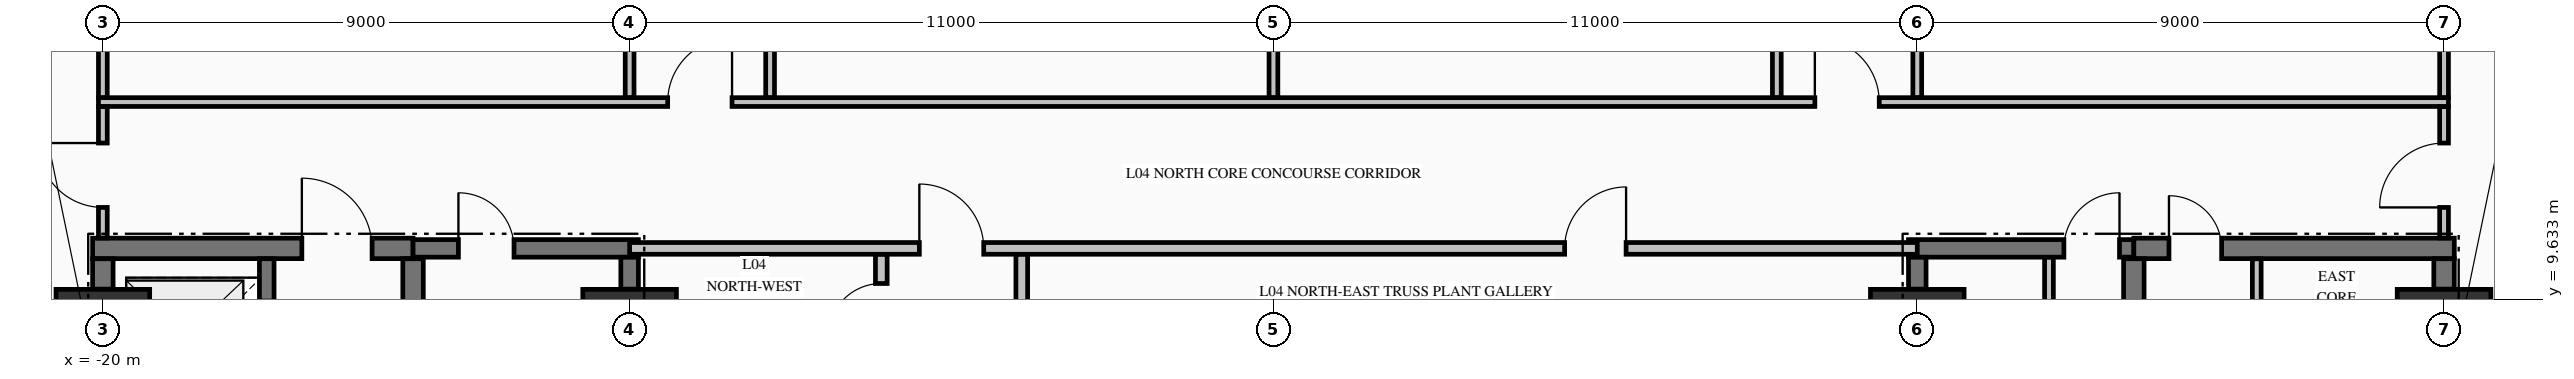
"""IFC4 building model, lengths in metres.
Left out: names, types, materials, properties, quantities, classifications, styles, units other than length and angle.
Written with IfcOpenShell. Run it as: python <this file> out.ifc"""

import sys

from ifc_helpers import new_model, si_unit, direction, frame, frame_2d, origin, origin_2d, place, context, subcontext, project, spatial, rectangle, extrude, element, fill, save


model = new_model("IFC4")
c1 = context("Model", 3, precision=1e-05, world=origin(), true_north=direction((0.0, 1.0)))
c2 = subcontext(c1, "Body", "Model", "MODEL_VIEW")
j1 = project(units=[si_unit("LENGTHUNIT", "METRE"), si_unit("PLANEANGLEUNIT", "RADIAN")], contexts=[c1])
p1 = place(None, origin())
s1 = spatial("IfcSite", under=j1, at=p1, CompositionType="ELEMENT")
p2 = place(p1, origin())
s2 = spatial("IfcBuilding", under=s1, at=p2, CompositionType="ELEMENT")
p3 = place(p2, frame((0.0, 0.0, 21.76)))
s3 = spatial("IfcBuildingStorey", under=s2, at=p3, CompositionType="ELEMENT", Elevation=21.76)
for number, where, z_axis, x_axis in (
    (1, (-20.0, 9.0, -0.45), (0.0, 0.0, 1.0), (1.0, 0.0, 0.0)),
    (2, (-11.0, 9.0, -0.45), (0.0, 0.0, 1.0), (1.0, 0.0, 0.0)),
    (3, (11.0, 9.0, -0.45), (0.0, 0.0, 1.0), (1.0, 0.0, 0.0)),
    (4, (20.0, 9.0, -0.45), (0.0, 0.0, 1.0), (1.0, 0.0, 0.0)),
):
    element("IfcColumn", number, at=place(p3, frame(where, z_axis=z_axis, x_axis=x_axis)), inside=s3, PredefinedType="COLUMN", context=c2, shape_type="SweptSolid", body=[
        extrude(rectangle(XDim=1.6, YDim=1.6, at=origin_2d()), origin(), (0.0, 0.0, 1.0), 5.44),
    ])
p4 = place(p3, frame((-20.175, 10.5, 0.0), z_axis=(0.0, 0.0, 1.0), x_axis=(1.0, 0.0, 0.0)))
e5 = element("IfcWall", 5, at=p4, inside=s3, PredefinedType="SHEAR", context=c2, shape_type="SweptSolid", body=[
    extrude(rectangle(XDim=5.475, YDim=0.35, at=frame_2d((2.738, 0.0))), origin(), (0.0, 0.0, 1.0), 4.99),
])
p5 = place(p4, frame((3.575, 0.0, 0.0)))
e6 = element("IfcOpeningElement", 6, at=p5, cuts=e5, PredefinedType="OPENING", context=c2, shape_type="SweptSolid", body=[
    extrude(rectangle(XDim=1.2, YDim=2.15, at=frame_2d((0.6, 1.075))), frame((0.0, 0.185, 0.0), z_axis=(0.0, -1.0, 0.0), x_axis=(1.0, 0.0, 0.0)), (0.0, 0.0, 1.0), 0.37),
])
p6 = place(p3, frame((-14.7, 10.5, 0.0), z_axis=(0.0, 0.0, 1.0), x_axis=(1.0, 0.0, 0.0)))
e7 = element("IfcWall", 7, at=p6, inside=s3, PredefinedType="SHEAR", context=c2, shape_type="SweptSolid", body=[
    extrude(rectangle(XDim=3.85, YDim=0.3, at=frame_2d((1.925, 0.0))), origin(), (0.0, 0.0, 1.0), 4.99),
])
p7 = place(p6, frame((0.775, 0.0, 0.0)))
e8 = element("IfcOpeningElement", 8, at=p7, cuts=e7, PredefinedType="OPENING", context=c2, shape_type="SweptSolid", body=[
    extrude(rectangle(XDim=0.95, YDim=2.15, at=frame_2d((0.475, 1.075))), frame((0.0, 0.16, 0.0), z_axis=(0.0, -1.0, 0.0), x_axis=(1.0, 0.0, 0.0)), (0.0, 0.0, 1.0), 0.32),
])
p8 = place(p3, frame((10.85, 10.5, 0.0), z_axis=(0.0, 0.0, 1.0), x_axis=(1.0, 0.0, 0.0)))
e9 = element("IfcWall", 9, at=p8, inside=s3, PredefinedType="SHEAR", context=c2, shape_type="SweptSolid", body=[
    extrude(rectangle(XDim=3.85, YDim=0.3, at=frame_2d((1.925, 0.0))), origin(), (0.0, 0.0, 1.0), 4.99),
])
p9 = place(p8, frame((2.655, 0.0, 0.0)))
e10 = element("IfcOpeningElement", 10, at=p9, cuts=e9, PredefinedType="OPENING", context=c2, shape_type="SweptSolid", body=[
    extrude(rectangle(XDim=0.95, YDim=2.15, at=frame_2d((0.475, 1.075))), frame((0.0, 0.16, 0.0), z_axis=(0.0, -1.0, 0.0), x_axis=(1.0, 0.0, 0.0)), (0.0, 0.0, 1.0), 0.32),
])
p10 = place(p3, frame((14.7, 10.5, 0.0), z_axis=(0.0, 0.0, 1.0), x_axis=(1.0, 0.0, 0.0)))
e11 = element("IfcWall", 11, at=p10, inside=s3, PredefinedType="SHEAR", context=c2, shape_type="SweptSolid", body=[
    extrude(rectangle(XDim=5.475, YDim=0.35, at=frame_2d((2.738, 0.0))), origin(), (0.0, 0.0, 1.0), 4.99),
])
p11 = place(p10, frame((0.6, 0.0, 0.0)))
e12 = element("IfcOpeningElement", 12, at=p11, cuts=e11, PredefinedType="OPENING", context=c2, shape_type="SweptSolid", body=[
    extrude(rectangle(XDim=0.9, YDim=2.15, at=frame_2d((0.45, 1.075))), frame((0.0, 0.185, 0.0), z_axis=(0.0, -1.0, 0.0), x_axis=(1.0, 0.0, 0.0)), (0.0, 0.0, 1.0), 0.37),
])
p12 = place(p3, frame((-11.0, 10.5, 0.0), z_axis=(0.0, 0.0, 1.0), x_axis=(1.0, 0.0, 0.0)))
e13 = element("IfcWall", 13, at=p12, inside=s3, PredefinedType="PARTITIONING", context=c2, shape_type="SweptSolid", body=[
    extrude(rectangle(XDim=22.0, YDim=0.2, at=frame_2d((11.0, 0.0))), origin(), (0.0, 0.0, 1.0), 3.332),
])
p13 = place(p12, frame((4.95, 0.0, 0.0)))
e14 = element("IfcOpeningElement", 14, at=p13, cuts=e13, PredefinedType="OPENING", context=c2, shape_type="SweptSolid", body=[
    extrude(rectangle(XDim=1.1, YDim=2.15, at=frame_2d((0.55, 1.075))), frame((0.0, 0.11, 0.0), z_axis=(0.0, -1.0, 0.0), x_axis=(1.0, 0.0, 0.0)), (0.0, 0.0, 1.0), 0.22),
])
p14 = place(p12, frame((15.975, 0.0, 0.0)))
e15 = element("IfcOpeningElement", 15, at=p14, cuts=e13, PredefinedType="OPENING", context=c2, shape_type="SweptSolid", body=[
    extrude(rectangle(XDim=1.05, YDim=2.15, at=frame_2d((0.525, 1.075))), frame((0.0, 0.11, 0.0), z_axis=(0.0, -1.0, 0.0), x_axis=(1.0, 0.0, 0.0)), (0.0, 0.0, 1.0), 0.22),
])
p15 = place(p3, frame((-20.075, 13.0, 0.0), z_axis=(0.0, 0.0, 1.0), x_axis=(1.0, 0.0, 0.0)))
e16 = element("IfcWall", 16, at=p15, inside=s3, PredefinedType="PARTITIONING", context=c2, shape_type="SweptSolid", body=[
    extrude(rectangle(XDim=40.15, YDim=0.15, at=frame_2d((20.075, 0.0))), origin(), (0.0, 0.0, 1.0), 4.99),
])
p16 = place(p15, frame((9.725, 0.0, 0.0)))
e17 = element("IfcOpeningElement", 17, at=p16, cuts=e16, PredefinedType="OPENING", context=c2, shape_type="SweptSolid", body=[
    extrude(rectangle(XDim=1.1, YDim=2.15, at=frame_2d((0.55, 1.075))), frame((0.0, 0.085, 0.0), z_axis=(0.0, -1.0, 0.0), x_axis=(1.0, 0.0, 0.0)), (0.0, 0.0, 1.0), 0.17),
])
p17 = place(p15, frame((29.325, 0.0, 0.0)))
e18 = element("IfcOpeningElement", 18, at=p17, cuts=e16, PredefinedType="OPENING", context=c2, shape_type="SweptSolid", body=[
    extrude(rectangle(XDim=1.1, YDim=2.15, at=frame_2d((0.55, 1.075))), frame((0.0, 0.085, 0.0), z_axis=(0.0, -1.0, 0.0), x_axis=(1.0, 0.0, 0.0)), (0.0, 0.0, 1.0), 0.17),
])
p18 = place(p3, frame((-20.0, 9.804, 0.0), z_axis=(0.0, 0.0, 1.0), x_axis=(0.0, 1.0, 0.0)))
e19 = element("IfcWall", 19, at=p18, inside=s3, PredefinedType="SHEAR", context=c2, shape_type="SweptSolid", body=[
    extrude(rectangle(XDim=0.519, YDim=0.35, at=frame_2d((0.26, 0.0))), origin(), (0.0, 0.0, 1.0), 4.99),
])
p19 = place(p3, frame((-17.2, 7.727, 0.0), z_axis=(0.0, 0.0, 1.0), x_axis=(0.0, 1.0, 0.0)))
e20 = element("IfcWall", 20, at=p19, inside=s3, PredefinedType="SOLIDWALL", context=c2, shape_type="SweptSolid", body=[
    extrude(rectangle(XDim=2.596, YDim=0.25, at=frame_2d((1.298, 0.0))), origin(), (0.0, 0.0, 1.0), 4.99),
])
p20 = place(p19, frame((0.773, 0.0, 0.0)))
e21 = element("IfcOpeningElement", 21, at=p20, cuts=e20, PredefinedType="OPENING", context=c2, shape_type="SweptSolid", body=[
    extrude(rectangle(XDim=1.1, YDim=2.2, at=frame_2d((0.55, 1.1))), frame((0.0, 0.135, 0.0), z_axis=(0.0, -1.0, 0.0), x_axis=(1.0, 0.0, 0.0)), (0.0, 0.0, 1.0), 0.27),
])
p21 = place(p3, frame((-14.7, 5.852, 0.0), z_axis=(0.0, 0.0, 1.0), x_axis=(0.0, 1.0, 0.0)))
e22 = element("IfcWall", 22, at=p21, inside=s3, PredefinedType="SHEAR", context=c2, shape_type="SweptSolid", body=[
    extrude(rectangle(XDim=4.471, YDim=0.35, at=frame_2d((2.235, 0.0))), origin(), (0.0, 0.0, 1.0), 4.99),
])
for number, where, z_axis, x_axis in (
    (23, (-11.0, 9.804, 0.0), (0.0, 0.0, 1.0), (0.0, 1.0, 0.0)),
    (24, (11.0, 9.804, 0.0), (0.0, 0.0, 1.0), (0.0, 1.0, 0.0)),
):
    element("IfcWall", number, at=place(p3, frame(where, z_axis=z_axis, x_axis=x_axis)), inside=s3, PredefinedType="SHEAR", context=c2, shape_type="SweptSolid", body=[
        extrude(rectangle(XDim=0.544, YDim=0.3, at=frame_2d((0.272, 0.0))), origin(), (0.0, 0.0, 1.0), 4.99),
    ])
p22 = place(p3, frame((14.7, 5.852, 0.0), z_axis=(0.0, 0.0, 1.0), x_axis=(0.0, 1.0, 0.0)))
e25 = element("IfcWall", 25, at=p22, inside=s3, PredefinedType="SHEAR", context=c2, shape_type="SweptSolid", body=[
    extrude(rectangle(XDim=4.471, YDim=0.35, at=frame_2d((2.235, 0.0))), origin(), (0.0, 0.0, 1.0), 4.99),
])
p23 = place(p3, frame((20.0, 9.804, 0.0), z_axis=(0.0, 0.0, 1.0), x_axis=(0.0, 1.0, 0.0)))
e26 = element("IfcWall", 26, at=p23, inside=s3, PredefinedType="SHEAR", context=c2, shape_type="SweptSolid", body=[
    extrude(rectangle(XDim=0.519, YDim=0.35, at=frame_2d((0.26, 0.0))), origin(), (0.0, 0.0, 1.0), 4.99),
])
p24 = place(p3, frame((-20.0, 10.678, 0.0), z_axis=(0.0, 0.0, 1.0), x_axis=(0.0, 1.0, 0.0)))
e27 = element("IfcWall", 27, at=p24, inside=s3, PredefinedType="PARTITIONING", context=c2, shape_type="SweptSolid", body=[
    extrude(rectangle(XDim=2.244, YDim=0.15, at=frame_2d((1.122, 0.0))), origin(), (0.0, 0.0, 1.0), 4.032),
])
p25 = place(p24, frame((0.522, 0.0, 0.0)))
e28 = element("IfcOpeningElement", 28, at=p25, cuts=e27, PredefinedType="OPENING", context=c2, shape_type="SweptSolid", body=[
    extrude(rectangle(XDim=1.1, YDim=2.15, at=frame_2d((0.55, 1.075))), frame((0.0, 0.085, 0.0), z_axis=(0.0, -1.0, 0.0), x_axis=(1.0, 0.0, 0.0)), (0.0, 0.0, 1.0), 0.17),
])
p26 = place(p3, frame((-20.0, 13.078, 0.0), z_axis=(0.0, 0.0, 1.0), x_axis=(0.0, 1.0, 0.0)))
e29 = element("IfcWall", 29, at=p26, inside=s3, PredefinedType="PARTITIONING", context=c2, shape_type="SweptSolid", body=[
    extrude(rectangle(XDim=2.116, YDim=0.15, at=frame_2d((1.058, 0.0))), origin(), (0.0, 0.0, 1.0), 4.032),
])
p27 = place(p3, frame((-11.0, 13.078, 0.0), z_axis=(0.0, 0.0, 1.0), x_axis=(0.0, 1.0, 0.0)))
e30 = element("IfcWall", 30, at=p27, inside=s3, PredefinedType="PARTITIONING", context=c2, shape_type="SweptSolid", body=[
    extrude(rectangle(XDim=2.116, YDim=0.15, at=frame_2d((1.058, 0.0))), origin(), (0.0, 0.0, 1.0), 3.332),
])
p28 = place(p3, frame((-8.6, 13.078, 0.0), z_axis=(0.0, 0.0, 1.0), x_axis=(0.0, 1.0, 0.0)))
e31 = element("IfcWall", 31, at=p28, inside=s3, PredefinedType="PARTITIONING", context=c2, shape_type="SweptSolid", body=[
    extrude(rectangle(XDim=2.844, YDim=0.15, at=frame_2d((1.422, 0.0))), origin(), (0.0, 0.0, 1.0), 4.99),
])
p29 = place(p3, frame((-6.7, 8.453, 0.0), z_axis=(0.0, 0.0, 1.0), x_axis=(0.0, 1.0, 0.0)))
e32 = element("IfcWall", 32, at=p29, inside=s3, PredefinedType="PARTITIONING", context=c2, shape_type="SweptSolid", body=[
    extrude(rectangle(XDim=1.944, YDim=0.2, at=frame_2d((0.972, 0.0))), origin(), (0.0, 0.0, 1.0), 4.99),
])
p30 = place(p29, frame((0.547, 0.0, 0.0)))
e33 = element("IfcOpeningElement", 33, at=p30, cuts=e32, PredefinedType="OPENING", context=c2, shape_type="SweptSolid", body=[
    extrude(rectangle(XDim=0.9, YDim=2.15, at=frame_2d((0.45, 1.075))), frame((0.0, 0.11, 0.0), z_axis=(0.0, -1.0, 0.0), x_axis=(1.0, 0.0, 0.0)), (0.0, 0.0, 1.0), 0.22),
])
p31 = place(p3, frame((-4.3, 8.453, 0.0), z_axis=(0.0, 0.0, 1.0), x_axis=(0.0, 1.0, 0.0)))
e34 = element("IfcWall", 34, at=p31, inside=s3, PredefinedType="PARTITIONING", context=c2, shape_type="SweptSolid", body=[
    extrude(rectangle(XDim=1.944, YDim=0.2, at=frame_2d((0.972, 0.0))), origin(), (0.0, 0.0, 1.0), 4.99),
])
p32 = place(p3, frame((0.0, 13.078, 0.0), z_axis=(0.0, 0.0, 1.0), x_axis=(0.0, 1.0, 0.0)))
e35 = element("IfcWall", 35, at=p32, inside=s3, PredefinedType="PARTITIONING", context=c2, shape_type="SweptSolid", body=[
    extrude(rectangle(XDim=2.216, YDim=0.15, at=frame_2d((1.108, 0.0))), origin(), (0.0, 0.0, 1.0), 3.332),
])
p33 = place(p3, frame((8.6, 13.078, 0.0), z_axis=(0.0, 0.0, 1.0), x_axis=(0.0, 1.0, 0.0)))
e36 = element("IfcWall", 36, at=p33, inside=s3, PredefinedType="PARTITIONING", context=c2, shape_type="SweptSolid", body=[
    extrude(rectangle(XDim=2.844, YDim=0.15, at=frame_2d((1.422, 0.0))), origin(), (0.0, 0.0, 1.0), 4.99),
])
p34 = place(p3, frame((11.0, 13.078, 0.0), z_axis=(0.0, 0.0, 1.0), x_axis=(0.0, 1.0, 0.0)))
e37 = element("IfcWall", 37, at=p34, inside=s3, PredefinedType="PARTITIONING", context=c2, shape_type="SweptSolid", body=[
    extrude(rectangle(XDim=2.116, YDim=0.15, at=frame_2d((1.058, 0.0))), origin(), (0.0, 0.0, 1.0), 3.332),
])
p35 = place(p3, frame((13.25, 5.853, 0.0), z_axis=(0.0, 0.0, 1.0), x_axis=(0.0, 1.0, 0.0)))
e38 = element("IfcWall", 38, at=p35, inside=s3, PredefinedType="PARTITIONING", context=c2, shape_type="SweptSolid", body=[
    extrude(rectangle(XDim=4.494, YDim=0.15, at=frame_2d((2.247, 0.0))), origin(), (0.0, 0.0, 1.0), 4.99),
])
p36 = place(p35, frame((1.472, 0.0, 0.0)))
e39 = element("IfcOpeningElement", 39, at=p36, cuts=e38, PredefinedType="OPENING", context=c2, shape_type="SweptSolid", body=[
    extrude(rectangle(XDim=0.95, YDim=2.15, at=frame_2d((0.475, 1.075))), frame((0.0, 0.085, 0.0), z_axis=(0.0, -1.0, 0.0), x_axis=(1.0, 0.0, 0.0)), (0.0, 0.0, 1.0), 0.17),
])
p37 = place(p3, frame((16.8, 6.578, 0.0), z_axis=(0.0, 0.0, 1.0), x_axis=(0.0, 1.0, 0.0)))
e40 = element("IfcWall", 40, at=p37, inside=s3, PredefinedType="PARTITIONING", context=c2, shape_type="SweptSolid", body=[
    extrude(rectangle(XDim=3.744, YDim=0.15, at=frame_2d((1.872, 0.0))), origin(), (0.0, 0.0, 1.0), 4.99),
])
p38 = place(p37, frame((1.447, 0.0, 0.0)))
e41 = element("IfcOpeningElement", 41, at=p38, cuts=e40, PredefinedType="OPENING", context=c2, shape_type="SweptSolid", body=[
    extrude(rectangle(XDim=0.95, YDim=2.15, at=frame_2d((0.475, 1.075))), frame((0.0, 0.085, 0.0), z_axis=(0.0, -1.0, 0.0), x_axis=(1.0, 0.0, 0.0)), (0.0, 0.0, 1.0), 0.17),
])
p39 = place(p3, frame((20.0, 10.678, 0.0), z_axis=(0.0, 0.0, 1.0), x_axis=(0.0, 1.0, 0.0)))
e42 = element("IfcWall", 42, at=p39, inside=s3, PredefinedType="PARTITIONING", context=c2, shape_type="SweptSolid", body=[
    extrude(rectangle(XDim=2.244, YDim=0.15, at=frame_2d((1.122, 0.0))), origin(), (0.0, 0.0, 1.0), 3.332),
])
p40 = place(p39, frame((0.522, 0.0, 0.0)))
e43 = element("IfcOpeningElement", 43, at=p40, cuts=e42, PredefinedType="OPENING", context=c2, shape_type="SweptSolid", body=[
    extrude(rectangle(XDim=1.1, YDim=2.15, at=frame_2d((0.55, 1.075))), frame((0.0, 0.085, 0.0), z_axis=(0.0, -1.0, 0.0), x_axis=(1.0, 0.0, 0.0)), (0.0, 0.0, 1.0), 0.17),
])
p41 = place(p3, frame((20.0, 13.078, 0.0), z_axis=(0.0, 0.0, 1.0), x_axis=(0.0, 1.0, 0.0)))
e44 = element("IfcWall", 44, at=p41, inside=s3, PredefinedType="PARTITIONING", context=c2, shape_type="SweptSolid", body=[
    extrude(rectangle(XDim=2.116, YDim=0.15, at=frame_2d((1.058, 0.0))), origin(), (0.0, 0.0, 1.0), 3.332),
])
p42 = place(p7, origin())
e45 = element("IfcDoor", 45, at=p42, inside=s3, OperationType="SINGLE_SWING_LEFT", PredefinedType="DOOR", context=c2, shape_type="SweptSolid", body=[
    extrude(rectangle(XDim=0.95, YDim=2.15, at=frame_2d((0.475, 1.075))), frame((0.0, 0.025, 0.0), z_axis=(0.0, -1.0, 0.0), x_axis=(1.0, 0.0, 0.0)), (0.0, 0.0, 1.0), 0.05),
])
fill(e8, e45)
p43 = place(p9, origin())
e46 = element("IfcDoor", 46, at=p43, inside=s3, OperationType="SINGLE_SWING_RIGHT", PredefinedType="DOOR", context=c2, shape_type="SweptSolid", body=[
    extrude(rectangle(XDim=0.95, YDim=2.15, at=frame_2d((0.475, 1.075))), frame((0.0, 0.025, 0.0), z_axis=(0.0, -1.0, 0.0), x_axis=(1.0, 0.0, 0.0)), (0.0, 0.0, 1.0), 0.05),
])
fill(e10, e46)
p44 = place(p5, origin())
e47 = element("IfcDoor", 47, at=p44, inside=s3, OperationType="SINGLE_SWING_LEFT", PredefinedType="DOOR", context=c2, shape_type="SweptSolid", body=[
    extrude(rectangle(XDim=1.2, YDim=2.15, at=frame_2d((0.6, 1.075))), frame((0.0, 0.025, 0.0), z_axis=(0.0, -1.0, 0.0), x_axis=(1.0, 0.0, 0.0)), (0.0, 0.0, 1.0), 0.05),
])
fill(e6, e47)
p45 = place(p11, origin())
e48 = element("IfcDoor", 48, at=p45, inside=s3, OperationType="SINGLE_SWING_LEFT", PredefinedType="DOOR", context=c2, shape_type="SweptSolid", body=[
    extrude(rectangle(XDim=0.9, YDim=2.15, at=frame_2d((0.45, 1.075))), frame((0.0, 0.025, 0.0), z_axis=(0.0, -1.0, 0.0), x_axis=(1.0, 0.0, 0.0)), (0.0, 0.0, 1.0), 0.05),
])
fill(e12, e48)
p46 = place(p16, origin())
e49 = element("IfcDoor", 49, at=p46, inside=s3, OperationType="SINGLE_SWING_RIGHT", PredefinedType="DOOR", context=c2, shape_type="SweptSolid", body=[
    extrude(rectangle(XDim=1.1, YDim=2.15, at=frame_2d((0.55, 1.075))), frame((0.0, 0.025, 0.0), z_axis=(0.0, -1.0, 0.0), x_axis=(1.0, 0.0, 0.0)), (0.0, 0.0, 1.0), 0.05),
])
fill(e17, e49)
p47 = place(p17, origin())
e50 = element("IfcDoor", 50, at=p47, inside=s3, OperationType="SINGLE_SWING_LEFT", PredefinedType="DOOR", context=c2, shape_type="SweptSolid", body=[
    extrude(rectangle(XDim=1.1, YDim=2.15, at=frame_2d((0.55, 1.075))), frame((0.0, 0.025, 0.0), z_axis=(0.0, -1.0, 0.0), x_axis=(1.0, 0.0, 0.0)), (0.0, 0.0, 1.0), 0.05),
])
fill(e18, e50)
p48 = place(p25, origin())
e51 = element("IfcDoor", 51, at=p48, inside=s3, OperationType="SINGLE_SWING_RIGHT", PredefinedType="DOOR", context=c2, shape_type="SweptSolid", body=[
    extrude(rectangle(XDim=1.1, YDim=2.15, at=frame_2d((0.55, 1.075))), frame((0.0, 0.025, 0.0), z_axis=(0.0, -1.0, 0.0), x_axis=(1.0, 0.0, 0.0)), (0.0, 0.0, 1.0), 0.05),
])
fill(e28, e51)
p49 = place(p40, origin())
e52 = element("IfcDoor", 52, at=p49, inside=s3, OperationType="SINGLE_SWING_LEFT", PredefinedType="DOOR", context=c2, shape_type="SweptSolid", body=[
    extrude(rectangle(XDim=1.1, YDim=2.15, at=frame_2d((0.55, 1.075))), frame((0.0, 0.025, 0.0), z_axis=(0.0, -1.0, 0.0), x_axis=(1.0, 0.0, 0.0)), (0.0, 0.0, 1.0), 0.05),
])
fill(e43, e52)
p50 = place(p13, origin())
e53 = element("IfcDoor", 53, at=p50, inside=s3, OperationType="SINGLE_SWING_LEFT", PredefinedType="DOOR", context=c2, shape_type="SweptSolid", body=[
    extrude(rectangle(XDim=1.1, YDim=2.15, at=frame_2d((0.55, 1.075))), frame((0.0, 0.025, 0.0), z_axis=(0.0, -1.0, 0.0), x_axis=(1.0, 0.0, 0.0)), (0.0, 0.0, 1.0), 0.05),
])
fill(e14, e53)
p51 = place(p30, origin())
e54 = element("IfcDoor", 54, at=p51, inside=s3, OperationType="SINGLE_SWING_LEFT", PredefinedType="DOOR", context=c2, shape_type="SweptSolid", body=[
    extrude(rectangle(XDim=0.9, YDim=2.15, at=frame_2d((0.45, 1.075))), frame((0.0, 0.025, 0.0), z_axis=(0.0, -1.0, 0.0), x_axis=(1.0, 0.0, 0.0)), (0.0, 0.0, 1.0), 0.05),
])
fill(e33, e54)
p52 = place(p14, origin())
e55 = element("IfcDoor", 55, at=p52, inside=s3, OperationType="SINGLE_SWING_RIGHT", PredefinedType="DOOR", context=c2, shape_type="SweptSolid", body=[
    extrude(rectangle(XDim=1.05, YDim=2.15, at=frame_2d((0.525, 1.075))), frame((0.0, 0.025, 0.0), z_axis=(0.0, -1.0, 0.0), x_axis=(1.0, 0.0, 0.0)), (0.0, 0.0, 1.0), 0.05),
])
fill(e15, e55)
save(model, sys.argv[1])
